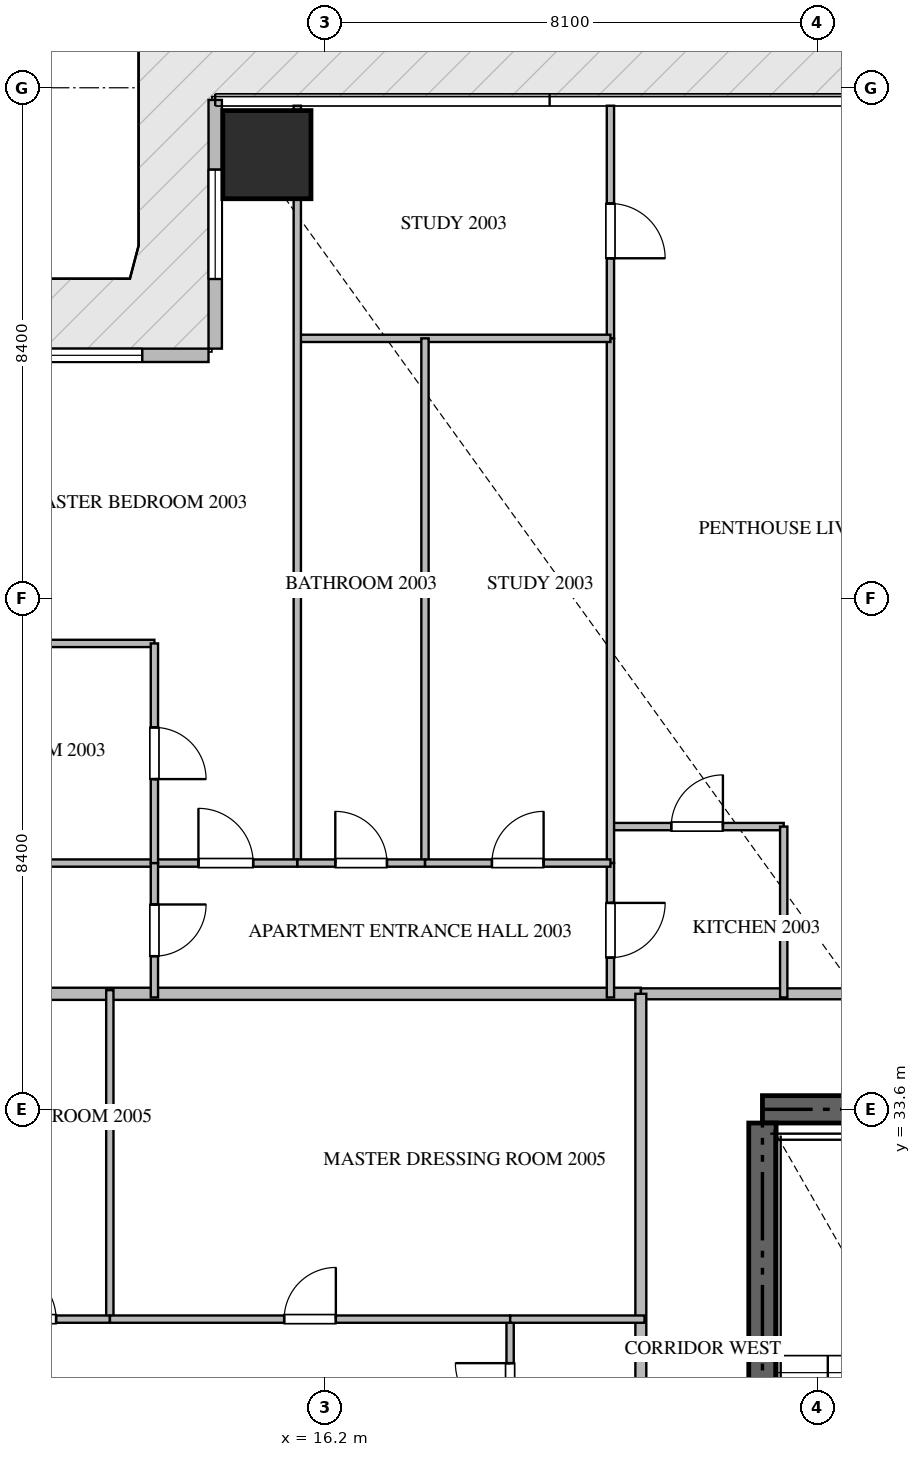
"""IFC4 building model, lengths in metres.
Left out: names, types, materials, properties, quantities, classifications, styles, units other than length and angle.
Written with IfcOpenShell. Run it as: python <this file> out.ifc"""

import sys

from ifc_helpers import new_model, si_unit, direction, frame, frame_2d, origin, origin_2d, place, context, subcontext, project, spatial, rectangle, extrude, source, transform, mapped, element, fill, save


model = new_model("IFC4")
c1 = context("Model", 3, precision=1e-05, world=origin(), true_north=direction((0.0, 1.0)))
c2 = subcontext(c1, "Body", "Model", "MODEL_VIEW")
j1 = project(units=[si_unit("LENGTHUNIT", "METRE"), si_unit("PLANEANGLEUNIT", "RADIAN")], contexts=[c1])
p1 = place(None, origin())
s1 = spatial("IfcSite", under=j1, at=p1, CompositionType="ELEMENT")
p2 = place(p1, origin())
s2 = spatial("IfcBuilding", under=s1, at=p2, CompositionType="ELEMENT")
p3 = place(p2, frame((0.0, 0.0, 82.95)))
s3 = spatial("IfcBuildingStorey", under=s2, at=p3, CompositionType="ELEMENT", Elevation=82.95)
p4 = place(p3, frame((41.4, 33.6, -0.26), z_axis=(0.0, 0.0, 1.0), x_axis=(-1.0, 0.0, 0.0)))
e1 = element("IfcWall", 1, at=p4, inside=s3, PredefinedType="SHEAR", context=c2, shape_type="SweptSolid", body=[
    extrude(rectangle(XDim=18.0, YDim=0.45, at=frame_2d((9.0, 0.0))), origin(), (0.0, 0.0, 1.0), 3.748),
])
p5 = place(p3, frame((23.4, 24.25, -0.26), z_axis=(0.0, 0.0, 1.0), x_axis=(0.0, 1.0, 0.0)))
e2 = element("IfcWall", 2, at=p5, inside=s3, PredefinedType="SHEAR", context=c2, shape_type="SweptSolid", body=[
    extrude(rectangle(XDim=9.125, YDim=0.45, at=frame_2d((4.562, 0.0))), origin(), (0.0, 0.0, 1.0), 3.748),
])
m1 = source(origin(), c2, "Body", "SweptSolid", [
    extrude(rectangle(XDim=1.45, YDim=1.45, at=origin_2d()), origin(), (0.0, 0.0, 1.0), 3.75),
])
p6 = place(p3, frame((15.25, 49.3, -0.26), z_axis=(0.0, 0.0, 1.0), x_axis=(1.0, 0.0, 0.0)))
e3 = element("IfcColumn", 3, at=p6, inside=s3, PredefinedType="COLUMN", context=c2, shape_type="MappedRepresentation", body=[
    mapped(m1, transform((0.0, 0.0, 0.0), scale=1.0)),
])
p7 = place(p3, frame((14.4, 50.2, 0.0), z_axis=(0.0, 0.0, 1.0), x_axis=(0.0, -1.0, 0.0)))
e4 = element("IfcWall", 4, at=p7, inside=s3, PredefinedType="ELEMENTEDWALL", context=c2, shape_type="SweptSolid", body=[
    extrude(rectangle(XDim=4.09, YDim=0.22, at=frame_2d((2.045, 0.0))), origin(), (0.0, 0.0, 1.0), 3.475),
])
p8 = place(p7, frame((1.145, 0.0, 0.65)))
e5 = element("IfcOpeningElement", 5, at=p8, cuts=e4, PredefinedType="OPENING", context=c2, shape_type="SweptSolid", body=[
    extrude(rectangle(XDim=1.8, YDim=2.1, at=frame_2d((0.9, 1.05))), frame((0.0, 0.12, 0.0), z_axis=(0.0, -1.0, 0.0), x_axis=(1.0, 0.0, 0.0)), (0.0, 0.0, 1.0), 0.24),
])
p9 = place(p3, frame((14.29, 46.0, 0.0), z_axis=(0.0, 0.0, 1.0), x_axis=(-1.0, 0.0, 0.0)))
e6 = element("IfcWall", 6, at=p9, inside=s3, PredefinedType="ELEMENTEDWALL", context=c2, shape_type="SweptSolid", body=[
    extrude(rectangle(XDim=3.98, YDim=0.22, at=frame_2d((1.99, 0.0))), origin(), (0.0, 0.0, 1.0), 3.475),
])
p10 = place(p9, frame((1.09, 0.0, 0.65)))
e7 = element("IfcOpeningElement", 7, at=p10, cuts=e6, PredefinedType="OPENING", context=c2, shape_type="SweptSolid", body=[
    extrude(rectangle(XDim=1.8, YDim=2.1, at=frame_2d((0.9, 1.05))), frame((0.0, 0.12, 0.0), z_axis=(0.0, -1.0, 0.0), x_axis=(1.0, 0.0, 0.0)), (0.0, 0.0, 1.0), 0.24),
])
p11 = place(p3, frame((6.082, 35.5, 0.0), z_axis=(0.0, 0.0, 1.0), x_axis=(1.0, 0.0, 0.0)))
e8 = element("IfcWall", 8, at=p11, inside=s3, PredefinedType="PARTITIONING", context=c2, shape_type="SweptSolid", body=[
    extrude(rectangle(XDim=15.318, YDim=0.2, at=frame_2d((7.659, 0.0))), origin(), (0.0, 0.0, 1.0), 3.49),
])
p12 = place(p3, frame((21.402, 35.5, 0.0), z_axis=(0.0, 0.0, 1.0), x_axis=(1.0, 0.0, 0.0)))
e9 = element("IfcWall", 9, at=p12, inside=s3, PredefinedType="PARTITIONING", context=c2, shape_type="SweptSolid", body=[
    extrude(rectangle(XDim=21.996, YDim=0.18, at=frame_2d((10.998, 0.0))), origin(), (0.0, 0.0, 1.0), 3.49),
])
p13 = place(p12, frame((4.724, 0.0, 0.0)))
e10 = element("IfcOpeningElement", 10, at=p13, cuts=e9, PredefinedType="OPENING", context=c2, shape_type="SweptSolid", body=[
    extrude(rectangle(XDim=1.0, YDim=2.15, at=frame_2d((0.5, 1.075))), frame((0.0, 0.1, 0.0), z_axis=(0.0, -1.0, 0.0), x_axis=(1.0, 0.0, 0.0)), (0.0, 0.0, 1.0), 0.2),
])
p14 = place(p12, frame((18.77, 0.0, 0.0)))
e11 = element("IfcOpeningElement", 11, at=p14, cuts=e9, PredefinedType="OPENING", context=c2, shape_type="SweptSolid", body=[
    extrude(rectangle(XDim=1.0, YDim=2.15, at=frame_2d((0.5, 1.075))), frame((0.0, 0.1, 0.0), z_axis=(0.0, -1.0, 0.0), x_axis=(1.0, 0.0, 0.0)), (0.0, 0.0, 1.0), 0.2),
])
p15 = place(p3, frame((21.4, 14.9, 0.0), z_axis=(0.0, 0.0, 1.0), x_axis=(0.0, 1.0, 0.0)))
e12 = element("IfcWall", 12, at=p15, inside=s3, PredefinedType="PARTITIONING", context=c2, shape_type="SweptSolid", body=[
    extrude(rectangle(XDim=20.6, YDim=0.18, at=frame_2d((10.3, 0.0))), origin(), (0.0, 0.0, 1.0), 3.49),
])
p16 = place(p15, frame((1.96, 0.0, 0.0)))
e13 = element("IfcOpeningElement", 13, at=p16, cuts=e12, PredefinedType="OPENING", context=c2, shape_type="SweptSolid", body=[
    extrude(rectangle(XDim=1.0, YDim=2.15, at=frame_2d((0.5, 1.075))), frame((0.0, 0.1, 0.0), z_axis=(0.0, -1.0, 0.0), x_axis=(1.0, 0.0, 0.0)), (0.0, 0.0, 1.0), 0.2),
])
p17 = place(p3, frame((20.9, 38.25, 0.0), z_axis=(0.0, 0.0, 1.0), x_axis=(1.0, 0.0, 0.0)))
e14 = element("IfcWall", 14, at=p17, inside=s3, PredefinedType="PARTITIONING", context=c2, shape_type="SweptSolid", body=[
    extrude(rectangle(XDim=2.85, YDim=0.12, at=frame_2d((1.425, 0.0))), origin(), (0.0, 0.0, 1.0), 3.49),
])
p18 = place(p17, frame((1.0, 0.0, 0.0)))
e15 = element("IfcOpeningElement", 15, at=p18, cuts=e14, PredefinedType="OPENING", context=c2, shape_type="SweptSolid", body=[
    extrude(rectangle(XDim=0.85, YDim=2.1, at=frame_2d((0.425, 1.05))), frame((0.0, 0.07, 0.0), z_axis=(0.0, -1.0, 0.0), x_axis=(1.0, 0.0, 0.0)), (0.0, 0.0, 1.0), 0.14),
])
p19 = place(p3, frame((23.75, 38.25, 0.0), z_axis=(0.0, 0.0, 1.0), x_axis=(0.0, -1.0, 0.0)))
e16 = element("IfcWall", 16, at=p19, inside=s3, PredefinedType="PARTITIONING", context=c2, shape_type="SweptSolid", body=[
    extrude(rectangle(XDim=2.81, YDim=0.12, at=frame_2d((1.405, 0.0))), origin(), (0.0, 0.0, 1.0), 3.49),
])
p20 = place(p3, frame((20.9, 37.65, 0.0), z_axis=(0.0, 0.0, 1.0), x_axis=(0.0, -1.0, 0.0)))
e17 = element("IfcWall", 17, at=p20, inside=s3, PredefinedType="PARTITIONING", context=c2, shape_type="SweptSolid", body=[
    extrude(rectangle(XDim=2.21, YDim=0.12, at=frame_2d((1.105, 0.0))), origin(), (0.0, 0.0, 1.0), 3.49),
])
p21 = place(p20, frame((0.655, 0.0, 0.0)))
e18 = element("IfcOpeningElement", 18, at=p21, cuts=e17, PredefinedType="OPENING", context=c2, shape_type="SweptSolid", body=[
    extrude(rectangle(XDim=0.9, YDim=2.1, at=frame_2d((0.45, 1.05))), frame((0.0, 0.07, 0.0), z_axis=(0.0, -1.0, 0.0), x_axis=(1.0, 0.0, 0.0)), (0.0, 0.0, 1.0), 0.14),
])
p22 = place(p3, frame((20.9, 50.105, 0.0), z_axis=(0.0, 0.0, 1.0), x_axis=(0.0, -1.0, 0.0)))
e19 = element("IfcWall", 19, at=p22, inside=s3, PredefinedType="PARTITIONING", context=c2, shape_type="SweptSolid", body=[
    extrude(rectangle(XDim=3.826, YDim=0.12, at=frame_2d((1.913, 0.0))), origin(), (0.0, 0.0, 1.0), 3.49),
])
p23 = place(p22, frame((1.609, 0.0, 0.0)))
e20 = element("IfcOpeningElement", 20, at=p23, cuts=e19, PredefinedType="OPENING", context=c2, shape_type="SweptSolid", body=[
    extrude(rectangle(XDim=0.9, YDim=2.1, at=frame_2d((0.45, 1.05))), frame((0.0, 0.07, 0.0), z_axis=(0.0, -1.0, 0.0), x_axis=(1.0, 0.0, 0.0)), (0.0, 0.0, 1.0), 0.14),
])
p24 = place(p3, frame((20.9, 46.277, 0.0), z_axis=(0.0, 0.0, 1.0), x_axis=(0.0, -1.0, 0.0)))
e21 = element("IfcWall", 21, at=p24, inside=s3, PredefinedType="PARTITIONING", context=c2, shape_type="SweptSolid", body=[
    extrude(rectangle(XDim=8.625, YDim=0.12, at=frame_2d((4.312, 0.0))), origin(), (0.0, 0.0, 1.0), 3.49),
])
p25 = place(p3, frame((15.75, 46.279, 0.0), z_axis=(0.0, 0.0, 1.0), x_axis=(1.0, 0.0, 0.0)))
e22 = element("IfcWall", 22, at=p25, inside=s3, PredefinedType="PARTITIONING", context=c2, shape_type="SweptSolid", body=[
    extrude(rectangle(XDim=5.15, YDim=0.12, at=frame_2d((2.575, 0.0))), origin(), (0.0, 0.0, 1.0), 3.49),
])
p26 = place(p3, frame((15.75, 50.105, 0.0), z_axis=(0.0, 0.0, 1.0), x_axis=(0.0, -1.0, 0.0)))
e23 = element("IfcWall", 23, at=p26, inside=s3, PredefinedType="PARTITIONING", context=c2, shape_type="SweptSolid", body=[
    extrude(rectangle(XDim=12.455, YDim=0.12, at=frame_2d((6.228, 0.0))), origin(), (0.0, 0.0, 1.0), 3.49),
])
p27 = place(p3, frame((17.85, 46.279, 0.0), z_axis=(0.0, 0.0, 1.0), x_axis=(0.0, -1.0, 0.0)))
e24 = element("IfcWall", 24, at=p27, inside=s3, PredefinedType="PARTITIONING", context=c2, shape_type="SweptSolid", body=[
    extrude(rectangle(XDim=8.629, YDim=0.12, at=frame_2d((4.314, 0.0))), origin(), (0.0, 0.0, 1.0), 3.49),
])
p28 = place(p3, frame((15.75, 37.65, 0.0), z_axis=(0.0, 0.0, 1.0), x_axis=(1.0, 0.0, 0.0)))
e25 = element("IfcWall", 25, at=p28, inside=s3, PredefinedType="PARTITIONING", context=c2, shape_type="SweptSolid", body=[
    extrude(rectangle(XDim=2.1, YDim=0.12, at=frame_2d((1.05, 0.0))), origin(), (0.0, 0.0, 1.0), 3.49),
])
p29 = place(p28, frame((0.625, 0.0, 0.0)))
e26 = element("IfcOpeningElement", 26, at=p29, cuts=e25, PredefinedType="OPENING", context=c2, shape_type="SweptSolid", body=[
    extrude(rectangle(XDim=0.85, YDim=2.1, at=frame_2d((0.425, 1.05))), frame((0.0, 0.07, 0.0), z_axis=(0.0, -1.0, 0.0), x_axis=(1.0, 0.0, 0.0)), (0.0, 0.0, 1.0), 0.14),
])
p30 = place(p3, frame((17.852, 37.65, 0.0), z_axis=(0.0, 0.0, 1.0), x_axis=(1.0, 0.0, 0.0)))
e27 = element("IfcWall", 27, at=p30, inside=s3, PredefinedType="PARTITIONING", context=c2, shape_type="SweptSolid", body=[
    extrude(rectangle(XDim=3.048, YDim=0.12, at=frame_2d((1.524, 0.0))), origin(), (0.0, 0.0, 1.0), 3.49),
])
p31 = place(p30, frame((1.099, 0.0, 0.0)))
e28 = element("IfcOpeningElement", 28, at=p31, cuts=e27, PredefinedType="OPENING", context=c2, shape_type="SweptSolid", body=[
    extrude(rectangle(XDim=0.85, YDim=2.1, at=frame_2d((0.425, 1.05))), frame((0.0, 0.07, 0.0), z_axis=(0.0, -1.0, 0.0), x_axis=(1.0, 0.0, 0.0)), (0.0, 0.0, 1.0), 0.14),
])
p32 = place(p3, frame((13.4, 37.65, 0.0), z_axis=(0.0, 0.0, 1.0), x_axis=(1.0, 0.0, 0.0)))
e29 = element("IfcWall", 29, at=p32, inside=s3, PredefinedType="PARTITIONING", context=c2, shape_type="SweptSolid", body=[
    extrude(rectangle(XDim=2.348, YDim=0.12, at=frame_2d((1.174, 0.0))), origin(), (0.0, 0.0, 1.0), 3.49),
])
p33 = place(p32, frame((0.724, 0.0, 0.0)))
e30 = element("IfcOpeningElement", 30, at=p33, cuts=e29, PredefinedType="OPENING", context=c2, shape_type="SweptSolid", body=[
    extrude(rectangle(XDim=0.9, YDim=2.1, at=frame_2d((0.45, 1.05))), frame((0.0, 0.07, 0.0), z_axis=(0.0, -1.0, 0.0), x_axis=(1.0, 0.0, 0.0)), (0.0, 0.0, 1.0), 0.14),
])
p34 = place(p3, frame((9.7, 41.262, 0.0), z_axis=(0.0, 0.0, 1.0), x_axis=(1.0, 0.0, 0.0)))
e31 = element("IfcWall", 31, at=p34, inside=s3, PredefinedType="PARTITIONING", context=c2, shape_type="SweptSolid", body=[
    extrude(rectangle(XDim=3.7, YDim=0.12, at=frame_2d((1.85, 0.0))), origin(), (0.0, 0.0, 1.0), 3.49),
])
p35 = place(p3, frame((9.7, 37.65, 0.0), z_axis=(0.0, 0.0, 1.0), x_axis=(1.0, 0.0, 0.0)))
e32 = element("IfcWall", 32, at=p35, inside=s3, PredefinedType="PARTITIONING", context=c2, shape_type="SweptSolid", body=[
    extrude(rectangle(XDim=3.698, YDim=0.12, at=frame_2d((1.849, 0.0))), origin(), (0.0, 0.0, 1.0), 3.49),
])
p36 = place(p3, frame((13.4, 41.262, 0.0), z_axis=(0.0, 0.0, 1.0), x_axis=(0.0, -1.0, 0.0)))
e33 = element("IfcWall", 33, at=p36, inside=s3, PredefinedType="PARTITIONING", context=c2, shape_type="SweptSolid", body=[
    extrude(rectangle(XDim=3.612, YDim=0.12, at=frame_2d((1.806, 0.0))), origin(), (0.0, 0.0, 1.0), 3.49),
])
p37 = place(p36, frame((1.381, 0.0, 0.0)))
e34 = element("IfcOpeningElement", 34, at=p37, cuts=e33, PredefinedType="OPENING", context=c2, shape_type="SweptSolid", body=[
    extrude(rectangle(XDim=0.85, YDim=2.1, at=frame_2d((0.425, 1.05))), frame((0.0, 0.07, 0.0), z_axis=(0.0, -1.0, 0.0), x_axis=(1.0, 0.0, 0.0)), (0.0, 0.0, 1.0), 0.14),
])
p38 = place(p3, frame((13.4, 37.648, 0.0), z_axis=(0.0, 0.0, 1.0), x_axis=(0.0, -1.0, 0.0)))
e35 = element("IfcWall", 35, at=p38, inside=s3, PredefinedType="PARTITIONING", context=c2, shape_type="SweptSolid", body=[
    extrude(rectangle(XDim=2.208, YDim=0.12, at=frame_2d((1.104, 0.0))), origin(), (0.0, 0.0, 1.0), 3.49),
])
p39 = place(p38, frame((0.679, 0.0, 0.0)))
e36 = element("IfcOpeningElement", 36, at=p39, cuts=e35, PredefinedType="OPENING", context=c2, shape_type="SweptSolid", body=[
    extrude(rectangle(XDim=0.85, YDim=2.1, at=frame_2d((0.425, 1.05))), frame((0.0, 0.07, 0.0), z_axis=(0.0, -1.0, 0.0), x_axis=(1.0, 0.0, 0.0)), (0.0, 0.0, 1.0), 0.14),
])
p40 = place(p3, frame((19.25, 27.802, 0.0), z_axis=(0.0, 0.0, 1.0), x_axis=(0.0, 1.0, 0.0)))
e37 = element("IfcWall", 37, at=p40, inside=s3, PredefinedType="PARTITIONING", context=c2, shape_type="SweptSolid", body=[
    extrude(rectangle(XDim=2.348, YDim=0.12, at=frame_2d((1.174, 0.0))), origin(), (0.0, 0.0, 1.0), 3.49),
])
p41 = place(p40, frame((0.724, 0.0, 0.0)))
e38 = element("IfcOpeningElement", 38, at=p41, cuts=e37, PredefinedType="OPENING", context=c2, shape_type="SweptSolid", body=[
    extrude(rectangle(XDim=0.9, YDim=2.1, at=frame_2d((0.45, 1.05))), frame((0.0, 0.07, 0.0), z_axis=(0.0, -1.0, 0.0), x_axis=(1.0, 0.0, 0.0)), (0.0, 0.0, 1.0), 0.14),
])
p42 = place(p3, frame((12.667, 30.15, 0.0), z_axis=(0.0, 0.0, 1.0), x_axis=(0.0, 1.0, 0.0)))
e39 = element("IfcWall", 39, at=p42, inside=s3, PredefinedType="PARTITIONING", context=c2, shape_type="SweptSolid", body=[
    extrude(rectangle(XDim=5.41, YDim=0.12, at=frame_2d((2.705, 0.0))), origin(), (0.0, 0.0, 1.0), 3.49),
])
p43 = place(p3, frame((10.05, 30.15, 0.0), z_axis=(0.0, 0.0, 1.0), x_axis=(1.0, 0.0, 0.0)))
e40 = element("IfcWall", 40, at=p43, inside=s3, PredefinedType="PARTITIONING", context=c2, shape_type="SweptSolid", body=[
    extrude(rectangle(XDim=2.617, YDim=0.12, at=frame_2d((1.309, 0.0))), origin(), (0.0, 0.0, 1.0), 3.49),
])
p44 = place(p43, frame((0.883, 0.0, 0.0)))
e41 = element("IfcOpeningElement", 41, at=p44, cuts=e40, PredefinedType="OPENING", context=c2, shape_type="SweptSolid", body=[
    extrude(rectangle(XDim=0.85, YDim=2.1, at=frame_2d((0.425, 1.05))), frame((0.0, 0.07, 0.0), z_axis=(0.0, -1.0, 0.0), x_axis=(1.0, 0.0, 0.0)), (0.0, 0.0, 1.0), 0.14),
])
p45 = place(p3, frame((12.669, 30.15, 0.0), z_axis=(0.0, 0.0, 1.0), x_axis=(1.0, 0.0, 0.0)))
e42 = element("IfcWall", 42, at=p45, inside=s3, PredefinedType="PARTITIONING", context=c2, shape_type="SweptSolid", body=[
    extrude(rectangle(XDim=6.581, YDim=0.12, at=frame_2d((3.291, 0.0))), origin(), (0.0, 0.0, 1.0), 3.49),
])
p46 = place(p45, frame((2.865, 0.0, 0.0)))
e43 = element("IfcOpeningElement", 43, at=p46, cuts=e42, PredefinedType="OPENING", context=c2, shape_type="SweptSolid", body=[
    extrude(rectangle(XDim=0.85, YDim=2.1, at=frame_2d((0.425, 1.05))), frame((0.0, 0.07, 0.0), z_axis=(0.0, -1.0, 0.0), x_axis=(1.0, 0.0, 0.0)), (0.0, 0.0, 1.0), 0.14),
])
p47 = place(p3, frame((19.252, 30.15, 0.0), z_axis=(0.0, 0.0, 1.0), x_axis=(1.0, 0.0, 0.0)))
e44 = element("IfcWall", 44, at=p47, inside=s3, PredefinedType="PARTITIONING", context=c2, shape_type="SweptSolid", body=[
    extrude(rectangle(XDim=2.208, YDim=0.12, at=frame_2d((1.104, 0.0))), origin(), (0.0, 0.0, 1.0), 3.49),
])
m2 = source(origin(), c2, "Body", "SweptSolid", [
    extrude(rectangle(XDim=1.8, YDim=2.1, at=frame_2d((0.9, 1.05))), frame((0.0, 0.03, 0.0), z_axis=(0.0, -1.0, 0.0), x_axis=(1.0, 0.0, 0.0)), (0.0, 0.0, 1.0), 0.06),
])
p48 = place(p8, origin())
e45 = element("IfcWindow", 45, at=p48, inside=s3, PartitioningType="SINGLE_PANEL", PredefinedType="WINDOW", context=c2, shape_type="MappedRepresentation", body=[
    mapped(m2, transform((0.0, 0.0, 0.0), scale=1.0)),
])
fill(e5, e45)
p49 = place(p10, origin())
e46 = element("IfcWindow", 46, at=p49, inside=s3, PartitioningType="SINGLE_PANEL", PredefinedType="WINDOW", context=c2, shape_type="MappedRepresentation", body=[
    mapped(m2, transform((0.0, 0.0, 0.0), scale=1.0)),
])
fill(e7, e46)
m3 = source(origin(), c2, "Body", "SweptSolid", [
    extrude(rectangle(XDim=0.85, YDim=2.1, at=frame_2d((0.425, 1.05))), frame((0.0, 0.025, 0.0), z_axis=(0.0, -1.0, 0.0), x_axis=(1.0, 0.0, 0.0)), (0.0, 0.0, 1.0), 0.05),
])
p50 = place(p18, origin())
e47 = element("IfcDoor", 47, at=p50, inside=s3, OperationType="SINGLE_SWING_RIGHT", PredefinedType="DOOR", context=c2, shape_type="MappedRepresentation", body=[
    mapped(m3, transform((0.0, 0.0, 0.0), scale=1.0)),
])
fill(e15, e47)
m4 = source(origin(), c2, "Body", "SweptSolid", [
    extrude(rectangle(XDim=0.9, YDim=2.1, at=frame_2d((0.45, 1.05))), frame((0.0, 0.025, 0.0), z_axis=(0.0, -1.0, 0.0), x_axis=(1.0, 0.0, 0.0)), (0.0, 0.0, 1.0), 0.05),
])
p51 = place(p21, origin())
e48 = element("IfcDoor", 48, at=p51, inside=s3, OperationType="SINGLE_SWING_LEFT", PredefinedType="DOOR", context=c2, shape_type="MappedRepresentation", body=[
    mapped(m4, transform((0.0, 0.0, 0.0), scale=1.0)),
])
fill(e18, e48)
p52 = place(p23, origin())
e49 = element("IfcDoor", 49, at=p52, inside=s3, OperationType="SINGLE_SWING_RIGHT", PredefinedType="DOOR", context=c2, shape_type="MappedRepresentation", body=[
    mapped(m4, transform((0.0, 0.0, 0.0), scale=1.0)),
])
fill(e20, e49)
p53 = place(p29, origin())
e50 = element("IfcDoor", 50, at=p53, inside=s3, OperationType="SINGLE_SWING_LEFT", PredefinedType="DOOR", context=c2, shape_type="MappedRepresentation", body=[
    mapped(m3, transform((0.0, 0.0, 0.0), scale=1.0)),
])
fill(e26, e50)
p54 = place(p31, origin())
e51 = element("IfcDoor", 51, at=p54, inside=s3, OperationType="SINGLE_SWING_RIGHT", PredefinedType="DOOR", context=c2, shape_type="MappedRepresentation", body=[
    mapped(m3, transform((0.0, 0.0, 0.0), scale=1.0)),
])
fill(e28, e51)
p55 = place(p33, origin())
e52 = element("IfcDoor", 52, at=p55, inside=s3, OperationType="SINGLE_SWING_LEFT", PredefinedType="DOOR", context=c2, shape_type="MappedRepresentation", body=[
    mapped(m4, transform((0.0, 0.0, 0.0), scale=1.0)),
])
fill(e30, e52)
p56 = place(p37, origin())
e53 = element("IfcDoor", 53, at=p56, inside=s3, OperationType="SINGLE_SWING_RIGHT", PredefinedType="DOOR", context=c2, shape_type="MappedRepresentation", body=[
    mapped(m3, transform((0.0, 0.0, 0.0), scale=1.0)),
])
fill(e34, e53)
p57 = place(p39, origin())
e54 = element("IfcDoor", 54, at=p57, inside=s3, OperationType="SINGLE_SWING_LEFT", PredefinedType="DOOR", context=c2, shape_type="MappedRepresentation", body=[
    mapped(m3, transform((0.0, 0.0, 0.0), scale=1.0)),
])
fill(e36, e54)
p58 = place(p41, origin())
e55 = element("IfcDoor", 55, at=p58, inside=s3, OperationType="SINGLE_SWING_RIGHT", PredefinedType="DOOR", context=c2, shape_type="MappedRepresentation", body=[
    mapped(m4, transform((0.0, 0.0, 0.0), scale=1.0)),
])
fill(e38, e55)
p59 = place(p44, origin())
e56 = element("IfcDoor", 56, at=p59, inside=s3, OperationType="SINGLE_SWING_LEFT", PredefinedType="DOOR", context=c2, shape_type="MappedRepresentation", body=[
    mapped(m3, transform((0.0, 0.0, 0.0), scale=1.0)),
])
fill(e41, e56)
p60 = place(p46, origin())
e57 = element("IfcDoor", 57, at=p60, inside=s3, OperationType="SINGLE_SWING_RIGHT", PredefinedType="DOOR", context=c2, shape_type="MappedRepresentation", body=[
    mapped(m3, transform((0.0, 0.0, 0.0), scale=1.0)),
])
fill(e43, e57)
save(model, sys.argv[1])
